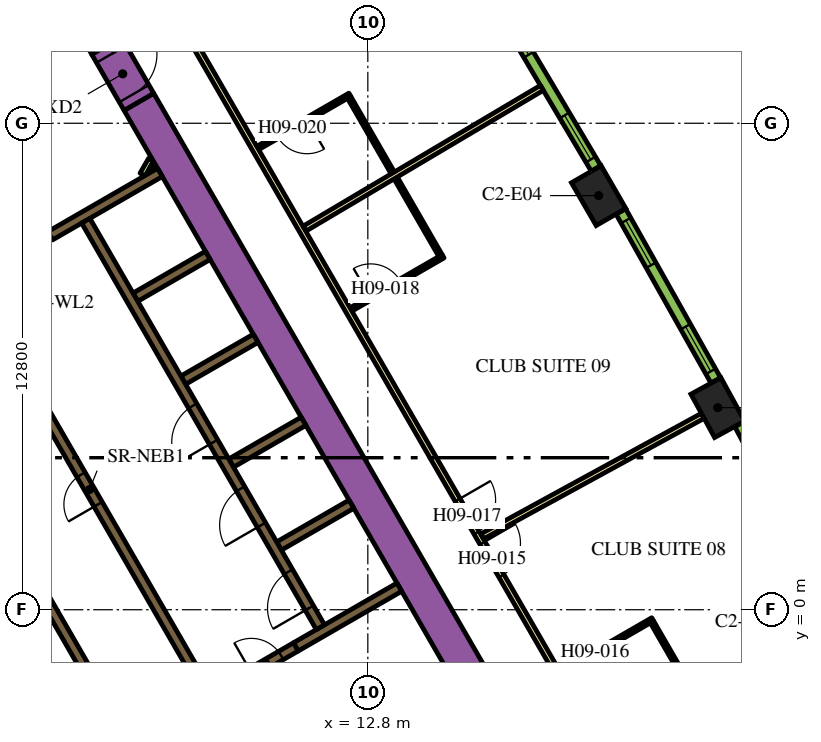
"""IFC4 building model, lengths in metres.
Left out: names, types, materials, properties, quantities, classifications, styles, units other than length and angle.
Written with IfcOpenShell. Run it as: python <this file> out.ifc"""

import sys

from ifc_helpers import new_model, si_unit, direction, frame, frame_2d, origin, origin_2d, place, context, subcontext, project, spatial, polyline, rectangle, outline, extrude, element, fill, save


model = new_model("IFC4")
c1 = context("Model", 3, precision=1e-05, world=origin(), true_north=direction((0.0, 1.0)))
c2 = subcontext(c1, "Body", "Model", "MODEL_VIEW")
j1 = project(units=[si_unit("LENGTHUNIT", "METRE"), si_unit("PLANEANGLEUNIT", "RADIAN")], contexts=[c1])
p1 = place(None, origin())
s1 = spatial("IfcSite", under=j1, at=p1, CompositionType="ELEMENT")
p2 = place(p1, origin())
s2 = spatial("IfcBuilding", under=s1, at=p2, CompositionType="ELEMENT")
p3 = place(p2, frame((0.0, 0.0, 122.7)))
s3 = spatial("IfcBuildingStorey", under=s2, at=p3, CompositionType="ELEMENT", Elevation=122.7)
for number, where, z_axis, x_axis in (
    (1, (22.009, 5.317, 0.0), (0.0, 0.0, 1.0), (-0.48, 0.877, 0.0)),
    (2, (18.874, 10.897, 0.0), (0.0, 0.0, 1.0), (-0.5, 0.866, 0.0)),
):
    element("IfcColumn", number, at=place(p3, frame(where, z_axis=z_axis, x_axis=x_axis)), inside=s3, PredefinedType="COLUMN", context=c2, shape_type="SweptSolid", body=[
        extrude(rectangle(XDim=1.3, YDim=0.9, at=origin_2d()), origin(), (0.0, 0.0, 1.0), 3.9),
    ])
p4 = place(p3, frame((6.776, 13.364, 0.0), z_axis=(0.0, 0.0, 1.0), x_axis=(0.500004177138, -0.8660229921, 0.0)))
e3 = element("IfcWall", 3, at=p4, inside=s3, PredefinedType="SOLIDWALL", context=c2, shape_type="SweptSolid", body=[
    extrude(rectangle(XDim=20.204, YDim=0.9, at=frame_2d((10.102, 0.0))), origin(), (0.0, 0.0, 1.0), 3.9),
])
p5 = place(p3, frame((5.926, 14.836, 0.0), z_axis=(0.0, 0.0, 1.0), x_axis=(-0.500076735116, 0.865981096212, 0.0)))
e4 = element("IfcWall", 4, at=p5, inside=s3, PredefinedType="SOLIDWALL", context=c2, shape_type="SweptSolid", body=[
    extrude(rectangle(XDim=1.094, YDim=0.9, at=frame_2d((0.547, 0.0))), origin(), (0.0, 0.0, 1.0), 3.9),
])
p6 = place(p3, frame((10.464, 1.677, 0.0), z_axis=(0.0, 0.0, 1.0), x_axis=(0.86605622881, 0.499946605688, 0.0)))
e5 = element("IfcWall", 5, at=p6, inside=s3, PredefinedType="SOLIDWALL", context=c2, shape_type="SweptSolid", body=[
    extrude(rectangle(XDim=2.2, YDim=0.25, at=frame_2d((1.1, 0.0))), origin(), (0.0, 0.0, 1.0), 3.9),
])
p7 = place(p3, frame((13.629, 0.594, 0.0), z_axis=(0.0, 0.0, 1.0), x_axis=(-0.86602790099, -0.499995674689, 0.0)))
e6 = element("IfcWall", 6, at=p7, inside=s3, PredefinedType="SOLIDWALL", context=c2, shape_type="SweptSolid", body=[
    extrude(rectangle(XDim=3.146, YDim=0.25, at=frame_2d((1.573, 0.0))), origin(), (0.0, 0.0, 1.0), 3.9),
])
for number, where, z_axis, x_axis in (
    (7, (9.204, 3.859, 0.0), (0.0, 0.0, 1.0), (0.866, 0.5, 0.0)),
    (8, (7.944, 6.041, 0.0), (0.0, 0.0, 1.0), (0.866, 0.5, 0.0)),
    (9, (6.684, 8.224, 0.0), (0.0, 0.0, 1.0), (0.866, 0.5, 0.0)),
):
    element("IfcWall", number, at=place(p3, frame(where, z_axis=z_axis, x_axis=x_axis)), inside=s3, PredefinedType="SOLIDWALL", context=c2, shape_type="SweptSolid", body=[
        extrude(rectangle(XDim=2.2, YDim=0.25, at=frame_2d((1.1, 0.0))), origin(), (0.0, 0.0, 1.0), 3.9),
    ])
p8 = place(p3, origin())
e10 = element("IfcWall", 10, at=p8, inside=s3, PredefinedType="SOLIDWALL", context=c2, shape_type="SweptSolid", body=[
    extrude(outline(polyline([(5.27, 10.173), (5.27, 10.173), (4.683, 9.834), (4.504, 9.731), (4.442, 9.839), (4.431, 9.856), (4.419, 9.871), (4.406, 9.885), (4.39, 9.898), (4.374, 9.909), (4.357, 9.918), (4.341, 9.925), (7.266, 11.614), (7.391, 11.398), (5.486, 10.298), (5.486, 10.298), (5.27, 10.173), (5.27, 10.173)])), origin(), (0.0, 0.0, 1.0), 3.9),
])
p9 = place(p3, frame((5.97, -2.591, 0.0), z_axis=(0.0, 0.0, 1.0), x_axis=(-0.499994469932, 0.866028596547, 0.0)))
e11 = element("IfcWall", 11, at=p9, inside=s3, PredefinedType="SOLIDWALL", context=c2, shape_type="SweptSolid", body=[
    extrude(rectangle(XDim=10.488, YDim=0.25, at=frame_2d((5.244, 0.0))), origin(), (0.0, 0.0, 1.0), 3.9),
])
p10 = place(p3, frame((6.872, 11.45, 0.0), z_axis=(0.0, 0.0, 1.0), x_axis=(0.499846793097, 0.866113839764, 0.0)))
e12 = element("IfcWall", 12, at=p10, inside=s3, PredefinedType="PARTITIONING", context=c2, shape_type="SweptSolid", body=[
    extrude(rectangle(XDim=0.453, YDim=0.15, at=frame_2d((0.227, 0.0))), origin(), (0.0, 0.0, 1.0), 2.75),
])
p11 = place(p3, frame((7.131, 11.6, 0.0), z_axis=(0.0, 0.0, 1.0), x_axis=(0.498600033135, 0.866832167699, 0.0)))
e13 = element("IfcWall", 13, at=p11, inside=s3, PredefinedType="PARTITIONING", context=c2, shape_type="SweptSolid", body=[
    extrude(rectangle(XDim=0.107, YDim=0.15, at=frame_2d((0.053, 0.0))), origin(), (0.0, 0.0, 1.0), 2.75),
])
p12 = place(p3, frame((11.553, -0.46, 0.0), z_axis=(0.0, 0.0, 1.0), x_axis=(-0.500006514828, 0.866021642414, 0.0)))
e14 = element("IfcWall", 14, at=p12, inside=s3, PredefinedType="SOLIDWALL", context=c2, shape_type="SweptSolid", body=[
    extrude(rectangle(XDim=12.35, YDim=0.25, at=frame_2d((6.175, 0.0))), origin(), (0.0, 0.0, 1.0), 3.9),
])
p13 = place(p12, frame((0.585, 0.0, 0.0)))
e15 = element("IfcOpeningElement", 15, at=p13, cuts=e14, PredefinedType="OPENING", context=c2, shape_type="SweptSolid", body=[
    extrude(rectangle(XDim=1.1, YDim=2.1, at=frame_2d((0.55, 1.05))), frame((0.0, 0.135, 0.0), z_axis=(0.0, -1.0, 0.0), x_axis=(1.0, 0.0, 0.0)), (0.0, 0.0, 1.0), 0.27),
])
p14 = place(p12, frame((3.105, 0.0, 0.0)))
e16 = element("IfcOpeningElement", 16, at=p14, cuts=e14, PredefinedType="OPENING", context=c2, shape_type="SweptSolid", body=[
    extrude(rectangle(XDim=1.1, YDim=2.1, at=frame_2d((0.55, 1.05))), frame((0.0, 0.135, 0.0), z_axis=(0.0, -1.0, 0.0), x_axis=(1.0, 0.0, 0.0)), (0.0, 0.0, 1.0), 0.27),
])
p15 = place(p12, frame((5.625, 0.0, 0.0)))
e17 = element("IfcOpeningElement", 17, at=p15, cuts=e14, PredefinedType="OPENING", context=c2, shape_type="SweptSolid", body=[
    extrude(rectangle(XDim=1.1, YDim=2.1, at=frame_2d((0.55, 1.05))), frame((0.0, 0.135, 0.0), z_axis=(0.0, -1.0, 0.0), x_axis=(1.0, 0.0, 0.0)), (0.0, 0.0, 1.0), 0.27),
])
p16 = place(p3, frame((8.565, -2.185, 0.0), z_axis=(0.0, 0.0, 1.0), x_axis=(-0.499997954832, 0.866026584559, 0.0)))
e18 = element("IfcWall", 18, at=p16, inside=s3, PredefinedType="SOLIDWALL", context=c2, shape_type="SweptSolid", body=[
    extrude(rectangle(XDim=12.35, YDim=0.25, at=frame_2d((6.175, 0.0))), origin(), (0.0, 0.0, 1.0), 3.9),
])
p17 = place(p16, frame((5.725, 0.0, 0.0)))
e19 = element("IfcOpeningElement", 19, at=p17, cuts=e18, PredefinedType="OPENING", context=c2, shape_type="SweptSolid", body=[
    extrude(rectangle(XDim=0.9, YDim=2.1, at=frame_2d((0.45, 1.05))), frame((0.0, 0.135, 0.0), z_axis=(0.0, -1.0, 0.0), x_axis=(1.0, 0.0, 0.0)), (0.0, 0.0, 1.0), 0.27),
])
p18 = place(p3, frame((9.346, -1.879, 0.0), z_axis=(0.0, 0.0, 1.0), x_axis=(0.866047807691, 0.499961193289, 0.0)))
e20 = element("IfcWall", 20, at=p18, inside=s3, PredefinedType="SOLIDWALL", context=c2, shape_type="SweptSolid", body=[
    extrude(rectangle(XDim=1.8, YDim=0.25, at=frame_2d((0.9, 0.0))), origin(), (0.0, 0.0, 1.0), 3.9),
])
p19 = place(p18, frame((0.45, 0.0, 0.0)))
e21 = element("IfcOpeningElement", 21, at=p19, cuts=e20, PredefinedType="OPENING", context=c2, shape_type="SweptSolid", body=[
    extrude(rectangle(XDim=0.9, YDim=2.1, at=frame_2d((0.45, 1.05))), frame((0.0, 0.135, 0.0), z_axis=(0.0, -1.0, 0.0), x_axis=(1.0, 0.0, 0.0)), (0.0, 0.0, 1.0), 0.27),
])
p20 = place(p3, frame((5.926, 14.836, 0.0), z_axis=(0.0, 0.0, 1.0), x_axis=(0.500062241894, -0.865989465428, 0.0)))
e22 = element("IfcWall", 22, at=p20, inside=s3, PredefinedType="SOLIDWALL", context=c2, shape_type="SweptSolid", body=[
    extrude(rectangle(XDim=1.7, YDim=0.9, at=frame_2d((0.85, 0.0))), origin(), (0.0, 0.0, 1.0), 3.9),
])
p21 = place(p20, frame((0.25, 0.0, 0.0)))
e23 = element("IfcOpeningElement", 23, at=p21, cuts=e22, PredefinedType="OPENING", context=c2, shape_type="SweptSolid", body=[
    extrude(rectangle(XDim=1.2, YDim=2.1, at=frame_2d((0.6, 1.05))), frame((0.0, 0.46, 0.0), z_axis=(0.0, -1.0, 0.0), x_axis=(1.0, 0.0, 0.0)), (0.0, 0.0, 1.0), 0.92),
])
p22 = place(p3, frame((6.163, 18.475, 0.0), z_axis=(0.0, 0.0, 1.0), x_axis=(0.500001317485, -0.866024643133, 0.0)))
e24 = element("IfcWall", 24, at=p22, inside=s3, PredefinedType="PARTITIONING", context=c2, shape_type="SweptSolid", body=[
    extrude(rectangle(XDim=25.767, YDim=0.15, at=frame_2d((12.883, 0.0))), origin(), (0.0, 0.0, 1.0), 2.75),
])
p23 = place(p22, frame((19.306, 0.0, 0.0)))
e25 = element("IfcOpeningElement", 25, at=p23, cuts=e24, PredefinedType="OPENING", context=c2, shape_type="SweptSolid", body=[
    extrude(rectangle(XDim=1.0, YDim=2.1, at=frame_2d((0.5, 1.05))), frame((0.0, 0.085, 0.0), z_axis=(0.0, -1.0, 0.0), x_axis=(1.0, 0.0, 0.0)), (0.0, 0.0, 1.0), 0.17),
])
p24 = place(p22, frame((17.999, 0.0, 0.0)))
e26 = element("IfcOpeningElement", 26, at=p24, cuts=e24, PredefinedType="OPENING", context=c2, shape_type="SweptSolid", body=[
    extrude(rectangle(XDim=1.0, YDim=2.1, at=frame_2d((0.5, 1.05))), frame((0.0, 0.085, 0.0), z_axis=(0.0, -1.0, 0.0), x_axis=(1.0, 0.0, 0.0)), (0.0, 0.0, 1.0), 0.17),
])
p25 = place(p22, frame((0.596, 0.0, 0.0)))
e27 = element("IfcOpeningElement", 27, at=p25, cuts=e24, PredefinedType="OPENING", context=c2, shape_type="SweptSolid", body=[
    extrude(rectangle(XDim=1.0, YDim=2.1, at=frame_2d((0.5, 1.05))), frame((0.0, 0.085, 0.0), z_axis=(0.0, -1.0, 0.0), x_axis=(1.0, 0.0, 0.0)), (0.0, 0.0, 1.0), 0.17),
])
p26 = place(p3, frame((17.379, 13.731, 0.0), z_axis=(0.0, 0.0, 1.0), x_axis=(-0.860132461691, -0.510070728768, 0.0)))
e28 = element("IfcWall", 28, at=p26, inside=s3, PredefinedType="PARTITIONING", context=c2, shape_type="SweptSolid", body=[
    extrude(rectangle(XDim=7.257, YDim=0.15, at=frame_2d((3.628, 0.0))), origin(), (0.0, 0.0, 1.0), 2.75),
])
p27 = place(p3, frame((21.614, 5.102, 0.0), z_axis=(0.0, 0.0, 1.0), x_axis=(-0.877484555087, -0.479604895287, 0.0)))
e29 = element("IfcWall", 29, at=p27, inside=s3, PredefinedType="PARTITIONING", context=c2, shape_type="SweptSolid", body=[
    extrude(rectangle(XDim=6.611, YDim=0.15, at=frame_2d((3.306, 0.0))), origin(), (0.0, 0.0, 1.0), 2.75),
])
p28 = place(p3, frame((20.296, -0.254, 0.0), z_axis=(0.0, 0.0, 1.0), x_axis=(-0.866034573852, -0.49998411664, 0.0)))
e30 = element("IfcWall", 30, at=p28, inside=s3, PredefinedType="PARTITIONING", context=c2, shape_type="SweptSolid", body=[
    extrude(rectangle(XDim=2.8, YDim=0.1, at=frame_2d((1.4, 0.0))), origin(), (0.0, 0.0, 1.0), 2.75),
])
p29 = place(p28, frame((1.3, 0.0, 0.0)))
e31 = element("IfcOpeningElement", 31, at=p29, cuts=e30, PredefinedType="OPENING", context=c2, shape_type="SweptSolid", body=[
    extrude(rectangle(XDim=0.9, YDim=2.1, at=frame_2d((0.45, 1.05))), frame((0.0, 0.06, 0.0), z_axis=(0.0, -1.0, 0.0), x_axis=(1.0, 0.0, 0.0)), (0.0, 0.0, 1.0), 0.12),
])
p30 = place(p3, frame((20.278, -0.323, 0.0), z_axis=(0.0, 0.0, 1.0), x_axis=(0.500001309137, -0.866024647952, 0.0)))
e32 = element("IfcWall", 32, at=p30, inside=s3, PredefinedType="PARTITIONING", context=c2, shape_type="SweptSolid", body=[
    extrude(rectangle(XDim=2.4, YDim=0.1, at=frame_2d((1.2, 0.0))), origin(), (0.0, 0.0, 1.0), 2.75),
])
p31 = place(p3, frame((12.355, 7.9, 0.0), z_axis=(0.0, 0.0, 1.0), x_axis=(0.866034573852, 0.49998411664, 0.0)))
e33 = element("IfcWall", 33, at=p31, inside=s3, PredefinedType="PARTITIONING", context=c2, shape_type="SweptSolid", body=[
    extrude(rectangle(XDim=2.8, YDim=0.1, at=frame_2d((1.4, 0.0))), origin(), (0.0, 0.0, 1.0), 2.75),
])
p32 = place(p31, frame((0.6, 0.0, 0.0)))
e34 = element("IfcOpeningElement", 34, at=p32, cuts=e33, PredefinedType="OPENING", context=c2, shape_type="SweptSolid", body=[
    extrude(rectangle(XDim=0.9, YDim=2.1, at=frame_2d((0.45, 1.05))), frame((0.0, 0.06, 0.0), z_axis=(0.0, -1.0, 0.0), x_axis=(1.0, 0.0, 0.0)), (0.0, 0.0, 1.0), 0.12),
])
p33 = place(p3, frame((14.712, 9.318, 0.0), z_axis=(0.0, 0.0, 1.0), x_axis=(-0.50000006957, 0.866025363618, 0.0)))
e35 = element("IfcWall", 35, at=p33, inside=s3, PredefinedType="PARTITIONING", context=c2, shape_type="SweptSolid", body=[
    extrude(rectangle(XDim=2.36, YDim=0.1, at=frame_2d((1.18, 0.0))), origin(), (0.0, 0.0, 1.0), 2.75),
])
p34 = place(p3, frame((12.327, 13.549, 0.0), z_axis=(0.0, 0.0, 1.0), x_axis=(-0.866056369097, -0.49994636267, 0.0)))
e36 = element("IfcWall", 36, at=p34, inside=s3, PredefinedType="PARTITIONING", context=c2, shape_type="SweptSolid", body=[
    extrude(rectangle(XDim=2.8, YDim=0.1, at=frame_2d((1.4, 0.0))), origin(), (0.0, 0.0, 1.0), 2.75),
])
p35 = place(p34, frame((1.3, 0.0, 0.0)))
e37 = element("IfcOpeningElement", 37, at=p35, cuts=e36, PredefinedType="OPENING", context=c2, shape_type="SweptSolid", body=[
    extrude(rectangle(XDim=0.9, YDim=2.1, at=frame_2d((0.45, 1.05))), frame((0.0, 0.06, 0.0), z_axis=(0.0, -1.0, 0.0), x_axis=(1.0, 0.0, 0.0)), (0.0, 0.0, 1.0), 0.12),
])
p36 = place(p3, frame((12.309, 13.481, 0.0), z_axis=(0.0, 0.0, 1.0), x_axis=(0.499968531483, -0.866043571379, 0.0)))
e38 = element("IfcWall", 38, at=p36, inside=s3, PredefinedType="PARTITIONING", context=c2, shape_type="SweptSolid", body=[
    extrude(rectangle(XDim=2.29, YDim=0.1, at=frame_2d((1.145, 0.0))), origin(), (0.0, 0.0, 1.0), 2.75),
])
p37 = place(p3, frame((24.977, 0.383, 0.0), z_axis=(0.0, 0.0, 1.0), x_axis=(-0.469323203119, 0.883026461106, 0.0)))
e39 = element("IfcWall", 39, at=p37, inside=s3, PredefinedType="SOLIDWALL", context=c2, shape_type="SweptSolid", body=[
    extrude(rectangle(XDim=5.101, YDim=0.29, at=frame_2d((2.55, 0.0))), origin(), (0.0, 0.0, 1.0), 3.65),
])
p38 = place(p37, frame((0.273, 0.0, 0.9)))
e40 = element("IfcOpeningElement", 40, at=p38, cuts=e39, PredefinedType="OPENING", context=c2, shape_type="SweptSolid", body=[
    extrude(rectangle(XDim=1.35, YDim=2.15, at=frame_2d((0.675, 1.075))), frame((0.0, 0.155, 0.0), z_axis=(0.0, -1.0, 0.0), x_axis=(1.0, 0.0, 0.0)), (0.0, 0.0, 1.0), 0.31),
])
p39 = place(p37, frame((3.478, 0.0, 0.9)))
e41 = element("IfcOpeningElement", 41, at=p39, cuts=e39, PredefinedType="OPENING", context=c2, shape_type="SweptSolid", body=[
    extrude(rectangle(XDim=1.35, YDim=2.15, at=frame_2d((0.675, 1.075))), frame((0.0, 0.155, 0.0), z_axis=(0.0, -1.0, 0.0), x_axis=(1.0, 0.0, 0.0)), (0.0, 0.0, 1.0), 0.31),
])
p40 = place(p3, frame((21.956, 6.033, 0.0), z_axis=(0.0, 0.0, 1.0), x_axis=(-0.48983164787, 0.87181704316, 0.0)))
e42 = element("IfcWall", 42, at=p40, inside=s3, PredefinedType="SOLIDWALL", context=c2, shape_type="SweptSolid", body=[
    extrude(rectangle(XDim=5.1, YDim=0.29, at=frame_2d((2.55, 0.0))), origin(), (0.0, 0.0, 1.0), 3.65),
])
p41 = place(p40, frame((0.273, 0.0, 0.9)))
e43 = element("IfcOpeningElement", 43, at=p41, cuts=e42, PredefinedType="OPENING", context=c2, shape_type="SweptSolid", body=[
    extrude(rectangle(XDim=1.35, YDim=2.15, at=frame_2d((0.675, 1.075))), frame((0.0, 0.155, 0.0), z_axis=(0.0, -1.0, 0.0), x_axis=(1.0, 0.0, 0.0)), (0.0, 0.0, 1.0), 0.31),
])
p42 = place(p40, frame((3.478, 0.0, 0.9)))
e44 = element("IfcOpeningElement", 44, at=p42, cuts=e42, PredefinedType="OPENING", context=c2, shape_type="SweptSolid", body=[
    extrude(rectangle(XDim=1.35, YDim=2.15, at=frame_2d((0.675, 1.075))), frame((0.0, 0.155, 0.0), z_axis=(0.0, -1.0, 0.0), x_axis=(1.0, 0.0, 0.0)), (0.0, 0.0, 1.0), 0.31),
])
p43 = place(p3, frame((18.805, 11.611, 0.0), z_axis=(0.0, 0.0, 1.0), x_axis=(-0.510054281659, 0.860142214847, 0.0)))
e45 = element("IfcWall", 45, at=p43, inside=s3, PredefinedType="SOLIDWALL", context=c2, shape_type="SweptSolid", body=[
    extrude(rectangle(XDim=5.101, YDim=0.29, at=frame_2d((2.55, 0.0))), origin(), (0.0, 0.0, 1.0), 3.65),
])
p44 = place(p43, frame((0.273, 0.0, 0.9)))
e46 = element("IfcOpeningElement", 46, at=p44, cuts=e45, PredefinedType="OPENING", context=c2, shape_type="SweptSolid", body=[
    extrude(rectangle(XDim=1.35, YDim=2.15, at=frame_2d((0.675, 1.075))), frame((0.0, 0.155, 0.0), z_axis=(0.0, -1.0, 0.0), x_axis=(1.0, 0.0, 0.0)), (0.0, 0.0, 1.0), 0.31),
])
p45 = place(p43, frame((3.478, 0.0, 0.9)))
e47 = element("IfcOpeningElement", 47, at=p45, cuts=e45, PredefinedType="OPENING", context=c2, shape_type="SweptSolid", body=[
    extrude(rectangle(XDim=1.35, YDim=2.15, at=frame_2d((0.675, 1.075))), frame((0.0, 0.155, 0.0), z_axis=(0.0, -1.0, 0.0), x_axis=(1.0, 0.0, 0.0)), (0.0, 0.0, 1.0), 0.31),
])
p46 = place(p13, origin())
e48 = element("IfcDoor", 48, at=p46, inside=s3, OperationType="DOUBLE_DOOR_SLIDING", PredefinedType="DOOR", context=c2, shape_type="SweptSolid", body=[
    extrude(rectangle(XDim=1.1, YDim=2.1, at=frame_2d((0.55, 1.05))), frame((0.0, 0.025, 0.0), z_axis=(0.0, -1.0, 0.0), x_axis=(1.0, 0.0, 0.0)), (0.0, 0.0, 1.0), 0.05),
])
fill(e15, e48)
p47 = place(p14, origin())
e49 = element("IfcDoor", 49, at=p47, inside=s3, OperationType="DOUBLE_DOOR_SLIDING", PredefinedType="DOOR", context=c2, shape_type="SweptSolid", body=[
    extrude(rectangle(XDim=1.1, YDim=2.1, at=frame_2d((0.55, 1.05))), frame((0.0, 0.025, 0.0), z_axis=(0.0, -1.0, 0.0), x_axis=(1.0, 0.0, 0.0)), (0.0, 0.0, 1.0), 0.05),
])
fill(e16, e49)
p48 = place(p15, origin())
e50 = element("IfcDoor", 50, at=p48, inside=s3, OperationType="DOUBLE_DOOR_SLIDING", PredefinedType="DOOR", context=c2, shape_type="SweptSolid", body=[
    extrude(rectangle(XDim=1.1, YDim=2.1, at=frame_2d((0.55, 1.05))), frame((0.0, 0.025, 0.0), z_axis=(0.0, -1.0, 0.0), x_axis=(1.0, 0.0, 0.0)), (0.0, 0.0, 1.0), 0.05),
])
fill(e17, e50)
p49 = place(p17, origin())
e51 = element("IfcDoor", 51, at=p49, inside=s3, OperationType="SINGLE_SWING_LEFT", PredefinedType="DOOR", context=c2, shape_type="SweptSolid", body=[
    extrude(rectangle(XDim=0.9, YDim=2.1, at=frame_2d((0.45, 1.05))), frame((0.0, 0.025, 0.0), z_axis=(0.0, -1.0, 0.0), x_axis=(1.0, 0.0, 0.0)), (0.0, 0.0, 1.0), 0.05),
])
fill(e19, e51)
p50 = place(p19, origin())
e52 = element("IfcDoor", 52, at=p50, inside=s3, OperationType="SINGLE_SWING_LEFT", PredefinedType="DOOR", context=c2, shape_type="SweptSolid", body=[
    extrude(rectangle(XDim=0.9, YDim=2.1, at=frame_2d((0.45, 1.05))), frame((0.0, 0.025, 0.0), z_axis=(0.0, -1.0, 0.0), x_axis=(1.0, 0.0, 0.0)), (0.0, 0.0, 1.0), 0.05),
])
fill(e21, e52)
p51 = place(p21, origin())
e53 = element("IfcDoor", 53, at=p51, inside=s3, OperationType="SINGLE_SWING_LEFT", PredefinedType="DOOR", context=c2, shape_type="SweptSolid", body=[
    extrude(rectangle(XDim=1.2, YDim=2.1, at=frame_2d((0.6, 1.05))), frame((0.0, 0.025, 0.0), z_axis=(0.0, -1.0, 0.0), x_axis=(1.0, 0.0, 0.0)), (0.0, 0.0, 1.0), 0.05),
])
fill(e23, e53)
p52 = place(p23, origin())
e54 = element("IfcDoor", 54, at=p52, inside=s3, OperationType="SINGLE_SWING_LEFT", PredefinedType="DOOR", context=c2, shape_type="SweptSolid", body=[
    extrude(rectangle(XDim=1.0, YDim=2.1, at=frame_2d((0.5, 1.05))), frame((0.0, 0.025, 0.0), z_axis=(0.0, -1.0, 0.0), x_axis=(1.0, 0.0, 0.0)), (0.0, 0.0, 1.0), 0.05),
])
fill(e25, e54)
p53 = place(p29, origin())
e55 = element("IfcDoor", 55, at=p53, inside=s3, OperationType="SINGLE_SWING_LEFT", PredefinedType="DOOR", context=c2, shape_type="SweptSolid", body=[
    extrude(rectangle(XDim=0.9, YDim=2.1, at=frame_2d((0.45, 1.05))), frame((0.0, 0.025, 0.0), z_axis=(0.0, -1.0, 0.0), x_axis=(1.0, 0.0, 0.0)), (0.0, 0.0, 1.0), 0.05),
])
fill(e31, e55)
p54 = place(p24, origin())
e56 = element("IfcDoor", 56, at=p54, inside=s3, OperationType="SINGLE_SWING_RIGHT", PredefinedType="DOOR", context=c2, shape_type="SweptSolid", body=[
    extrude(rectangle(XDim=1.0, YDim=2.1, at=frame_2d((0.5, 1.05))), frame((0.0, 0.025, 0.0), z_axis=(0.0, -1.0, 0.0), x_axis=(1.0, 0.0, 0.0)), (0.0, 0.0, 1.0), 0.05),
])
fill(e26, e56)
p55 = place(p32, origin())
e57 = element("IfcDoor", 57, at=p55, inside=s3, OperationType="SINGLE_SWING_RIGHT", PredefinedType="DOOR", context=c2, shape_type="SweptSolid", body=[
    extrude(rectangle(XDim=0.9, YDim=2.1, at=frame_2d((0.45, 1.05))), frame((0.0, 0.025, 0.0), z_axis=(0.0, -1.0, 0.0), x_axis=(1.0, 0.0, 0.0)), (0.0, 0.0, 1.0), 0.05),
])
fill(e34, e57)
p56 = place(p35, origin())
e58 = element("IfcDoor", 58, at=p56, inside=s3, OperationType="SINGLE_SWING_LEFT", PredefinedType="DOOR", context=c2, shape_type="SweptSolid", body=[
    extrude(rectangle(XDim=0.9, YDim=2.1, at=frame_2d((0.45, 1.05))), frame((0.0, 0.025, 0.0), z_axis=(0.0, -1.0, 0.0), x_axis=(1.0, 0.0, 0.0)), (0.0, 0.0, 1.0), 0.05),
])
fill(e37, e58)
p57 = place(p41, origin())
e59 = element("IfcWindow", 59, at=p57, inside=s3, PartitioningType="DOUBLE_PANEL_VERTICAL", PredefinedType="WINDOW", context=c2, shape_type="SweptSolid", body=[
    extrude(rectangle(XDim=1.35, YDim=2.15, at=frame_2d((0.675, 1.075))), frame((0.0, 0.015, 0.0), z_axis=(0.0, -1.0, 0.0), x_axis=(1.0, 0.0, 0.0)), (0.0, 0.0, 1.0), 0.06),
])
fill(e43, e59)
p58 = place(p42, origin())
e60 = element("IfcWindow", 60, at=p58, inside=s3, PartitioningType="DOUBLE_PANEL_VERTICAL", PredefinedType="WINDOW", context=c2, shape_type="SweptSolid", body=[
    extrude(rectangle(XDim=1.35, YDim=2.15, at=frame_2d((0.675, 1.075))), frame((0.0, 0.015, 0.0), z_axis=(0.0, -1.0, 0.0), x_axis=(1.0, 0.0, 0.0)), (0.0, 0.0, 1.0), 0.06),
])
fill(e44, e60)
p59 = place(p44, origin())
e61 = element("IfcWindow", 61, at=p59, inside=s3, PartitioningType="DOUBLE_PANEL_VERTICAL", PredefinedType="WINDOW", context=c2, shape_type="SweptSolid", body=[
    extrude(rectangle(XDim=1.35, YDim=2.15, at=frame_2d((0.675, 1.075))), frame((0.0, 0.015, 0.0), z_axis=(0.0, -1.0, 0.0), x_axis=(1.0, 0.0, 0.0)), (0.0, 0.0, 1.0), 0.06),
])
fill(e46, e61)
p60 = place(p45, origin())
e62 = element("IfcWindow", 62, at=p60, inside=s3, PartitioningType="DOUBLE_PANEL_VERTICAL", PredefinedType="WINDOW", context=c2, shape_type="SweptSolid", body=[
    extrude(rectangle(XDim=1.35, YDim=2.15, at=frame_2d((0.675, 1.075))), frame((0.0, 0.015, 0.0), z_axis=(0.0, -1.0, 0.0), x_axis=(1.0, 0.0, 0.0)), (0.0, 0.0, 1.0), 0.06),
])
fill(e47, e62)
save(model, sys.argv[1])
